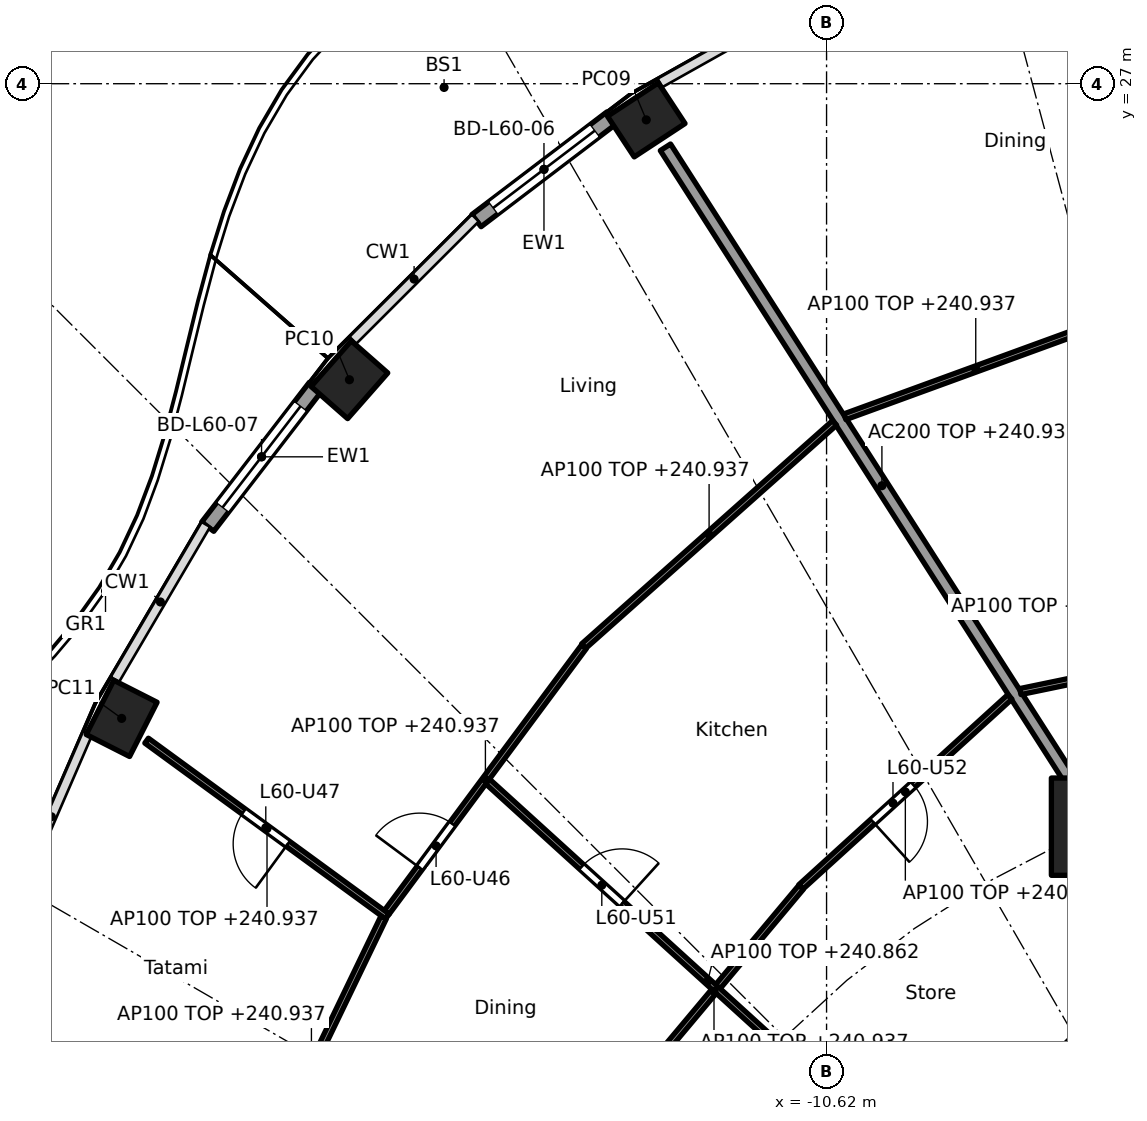
"""IFC4 building model, lengths in metres.
Left out: names, types, materials, properties, quantities, classifications, styles, units other than length and angle.
Written with IfcOpenShell. Run it as: python <this file> out.ifc"""

import sys

from ifc_helpers import new_model, si_unit, direction, frame, frame_2d, origin, origin_2d, place, context, subcontext, project, spatial, rectangle, hollow_rectangle, extrude, element, fill, save


model = new_model("IFC4")
c1 = context("Model", 3, precision=1e-05, world=origin(), true_north=direction((0.0, 1.0)))
c2 = subcontext(c1, "Body", "Model", "MODEL_VIEW")
j1 = project(units=[si_unit("LENGTHUNIT", "METRE"), si_unit("PLANEANGLEUNIT", "RADIAN")], contexts=[c1])
p1 = place(None, origin())
s1 = spatial("IfcSite", under=j1, at=p1, CompositionType="ELEMENT")
p2 = place(p1, origin())
s2 = spatial("IfcBuilding", under=s1, at=p2, CompositionType="ELEMENT")
p3 = place(p2, frame((0.0, 0.0, 238.1)))
s3 = spatial("IfcBuildingStorey", under=s2, at=p3, CompositionType="ELEMENT", Elevation=238.1)
for number, where, z_axis, x_axis in (
    (1, (-13.585, 26.405, 0.0), (0.0, 0.0, 1.0), (-0.836, -0.549, 0.0)),
    (2, (-18.467, 22.132, 0.0), (0.0, 0.0, 1.0), (-0.66, -0.751, 0.0)),
    (3, (-22.212, 16.563, 0.0), (0.0, 0.0, 1.0), (-0.452, -0.892, 0.0)),
):
    element("IfcColumn", number, at=place(p3, frame(where, z_axis=z_axis, x_axis=x_axis)), inside=s3, PredefinedType="COLUMN", context=c2, shape_type="SweptSolid", body=[
        extrude(hollow_rectangle(XDim=1.0, YDim=0.8, WallThickness=0.032, at=origin_2d()), origin(), (0.0, 0.0, 1.0), 3.7),
    ])
p4 = place(p3, frame((-6.123, 14.782, 0.0), z_axis=(0.0, 0.0, 1.0), x_axis=(1.0, 0.0, 0.0)))
e4 = element("IfcColumn", 4, at=p4, inside=s3, PredefinedType="COLUMN", context=c2, shape_type="SweptSolid", body=[
    extrude(rectangle(XDim=1.6, YDim=1.6, at=origin_2d()), origin(), (0.0, 0.0, 1.0), 3.7),
])
p5 = place(p3, frame((-16.377, 24.748, 0.0), z_axis=(0.0, 0.0, 1.0), x_axis=(0.795990084031, 0.60530966135, 0.0)))
e5 = element("IfcWall", 5, at=p5, inside=s3, PredefinedType="SOLIDWALL", context=c2, shape_type="SweptSolid", body=[
    extrude(rectangle(XDim=2.789, YDim=0.25, at=frame_2d((1.394, 0.0))), origin(), (0.0, 0.0, 1.0), 3.44),
])
p6 = place(p5, frame((0.344, 0.0, 0.0)))
e6 = element("IfcOpeningElement", 6, at=p6, cuts=e5, PredefinedType="OPENING", context=c2, shape_type="SweptSolid", body=[
    extrude(rectangle(XDim=2.1, YDim=2.4, at=frame_2d((1.05, 1.2))), frame((0.0, 0.135, 0.0), z_axis=(0.0, -1.0, 0.0), x_axis=(1.0, 0.0, 0.0)), (0.0, 0.0, 1.0), 0.27),
])
p7 = place(p3, frame((-20.797, 19.715, 0.0), z_axis=(0.0, 0.0, 1.0), x_axis=(0.610438565676, 0.792063607001, 0.0)))
e7 = element("IfcWall", 7, at=p7, inside=s3, PredefinedType="SOLIDWALL", context=c2, shape_type="SweptSolid", body=[
    extrude(rectangle(XDim=2.901, YDim=0.25, at=frame_2d((1.45, 0.0))), origin(), (0.0, 0.0, 1.0), 3.44),
])
p8 = place(p7, frame((0.4, 0.0, 0.0)))
e8 = element("IfcOpeningElement", 8, at=p8, cuts=e7, PredefinedType="OPENING", context=c2, shape_type="SweptSolid", body=[
    extrude(rectangle(XDim=2.1, YDim=2.4, at=frame_2d((1.05, 1.2))), frame((0.0, 0.135, 0.0), z_axis=(0.0, -1.0, 0.0), x_axis=(1.0, 0.0, 0.0)), (0.0, 0.0, 1.0), 0.27),
])
p9 = place(p3, frame((-6.15, 14.824, 0.0), z_axis=(0.0, 0.0, 1.0), x_axis=(-0.538870687577, 0.842388498301, 0.0)))
e9 = element("IfcWall", 9, at=p9, inside=s3, PredefinedType="PARTITIONING", context=c2, shape_type="SweptSolid", body=[
    extrude(rectangle(XDim=13.213, YDim=0.2, at=frame_2d((6.606, 0.0))), origin(), (0.0, 0.0, 1.0), 2.837),
])
p10 = place(p3, frame((-5.275, 12.494, 0.0), z_axis=(0.0, 0.0, 1.0), x_axis=(-0.707106781187, -0.707106781187, 0.0)))
e10 = element("IfcWall", 10, at=p10, inside=s3, PredefinedType="PARTITIONING", context=c2, shape_type="SweptSolid", body=[
    extrude(rectangle(XDim=10.209, YDim=0.2, at=frame_2d((5.104, 0.0))), origin(), (0.0, 0.0, 1.0), 3.44),
])
p11 = place(p3, frame((-4.182, 17.678, 0.0), z_axis=(0.0, 0.0, 1.0), x_axis=(-0.979196996208, -0.202911908517, 0.0)))
e11 = element("IfcWall", 11, at=p11, inside=s3, PredefinedType="PARTITIONING", context=c2, shape_type="SweptSolid", body=[
    extrude(rectangle(XDim=3.321, YDim=0.1, at=frame_2d((1.66, 0.0))), origin(), (0.0, 0.0, 1.0), 2.837),
])
p12 = place(p3, frame((-6.014, 23.094, 0.0), z_axis=(0.0, 0.0, 1.0), x_axis=(-0.939433575811, -0.342731026665, 0.0)))
e12 = element("IfcWall", 12, at=p12, inside=s3, PredefinedType="PARTITIONING", context=c2, shape_type="SweptSolid", body=[
    extrude(rectangle(XDim=4.583, YDim=0.1, at=frame_2d((2.291, 0.0))), origin(), (0.0, 0.0, 1.0), 2.837),
])
p13 = place(p3, frame((-7.605, 16.917, 0.0), z_axis=(0.0, 0.0, 1.0), x_axis=(-0.739828340504, -0.672795679673, 0.0)))
e13 = element("IfcWall", 13, at=p13, inside=s3, PredefinedType="PARTITIONING", context=c2, shape_type="SweptSolid", body=[
    extrude(rectangle(XDim=4.647, YDim=0.1, at=frame_2d((2.324, 0.0))), origin(), (0.0, 0.0, 1.0), 2.837),
])
p14 = place(p13, frame((2.148, 0.0, 0.0)))
e14 = element("IfcOpeningElement", 14, at=p14, cuts=e13, PredefinedType="OPENING", context=c2, shape_type="SweptSolid", body=[
    extrude(rectangle(XDim=0.9, YDim=2.1, at=frame_2d((0.45, 1.05))), frame((0.0, 0.06, 0.0), z_axis=(0.0, -1.0, 0.0), x_axis=(1.0, 0.0, 0.0)), (0.0, 0.0, 1.0), 0.12),
])
p15 = place(p3, frame((-10.488, 21.422, 0.0), z_axis=(0.0, 0.0, 1.0), x_axis=(-0.747153269812, -0.66465178207, 0.0)))
e15 = element("IfcWall", 15, at=p15, inside=s3, PredefinedType="PARTITIONING", context=c2, shape_type="SweptSolid", body=[
    extrude(rectangle(XDim=5.525, YDim=0.1, at=frame_2d((2.762, 0.0))), origin(), (0.0, 0.0, 1.0), 2.837),
])
p16 = place(p3, frame((-11.039, 13.785, 0.0), z_axis=(0.0, 0.0, 1.0), x_axis=(-0.642254625966, -0.766491353784, 0.0)))
e16 = element("IfcWall", 16, at=p16, inside=s3, PredefinedType="PARTITIONING", context=c2, shape_type="SweptSolid", body=[
    extrude(rectangle(XDim=4.461, YDim=0.1, at=frame_2d((2.23, 0.0))), origin(), (0.0, 0.0, 1.0), 2.837),
])
p17 = place(p3, frame((-14.608, 17.743, 0.0), z_axis=(0.0, 0.0, 1.0), x_axis=(-0.596174489482, -0.8028548923, 0.0)))
e17 = element("IfcWall", 17, at=p17, inside=s3, PredefinedType="PARTITIONING", context=c2, shape_type="SweptSolid", body=[
    extrude(rectangle(XDim=5.442, YDim=0.1, at=frame_2d((2.721, 0.0))), origin(), (0.0, 0.0, 1.0), 2.837),
])
p18 = place(p17, frame((3.631, 0.0, 0.0)))
e18 = element("IfcOpeningElement", 18, at=p18, cuts=e17, PredefinedType="OPENING", context=c2, shape_type="SweptSolid", body=[
    extrude(rectangle(XDim=0.9, YDim=2.1, at=frame_2d((0.45, 1.05))), frame((0.0, 0.06, 0.0), z_axis=(0.0, -1.0, 0.0), x_axis=(1.0, 0.0, 0.0)), (0.0, 0.0, 1.0), 0.12),
])
p19 = place(p3, frame((-8.959, 8.952, 0.0), z_axis=(0.0, 0.0, 1.0), x_axis=(-0.740140081805, 0.672452719011, 0.0)))
e19 = element("IfcWall", 19, at=p19, inside=s3, PredefinedType="PARTITIONING", context=c2, shape_type="SweptSolid", body=[
    extrude(rectangle(XDim=9.775, YDim=0.1, at=frame_2d((4.887, 0.0))), origin(), (0.0, 0.0, 1.0), 2.762),
])
p20 = place(p19, frame((6.789, 0.0, 0.0)))
e20 = element("IfcOpeningElement", 20, at=p20, cuts=e19, PredefinedType="OPENING", context=c2, shape_type="SweptSolid", body=[
    extrude(rectangle(XDim=0.9, YDim=2.1, at=frame_2d((0.45, 1.05))), frame((0.0, 0.06, 0.0), z_axis=(0.0, -1.0, 0.0), x_axis=(1.0, 0.0, 0.0)), (0.0, 0.0, 1.0), 0.12),
])
p21 = place(p3, frame((-17.842, 13.304, 0.0), z_axis=(0.0, 0.0, 1.0), x_axis=(-0.807541617862, 0.589810592835, 0.0)))
e21 = element("IfcWall", 21, at=p21, inside=s3, PredefinedType="PARTITIONING", context=c2, shape_type="SweptSolid", body=[
    extrude(rectangle(XDim=4.903, YDim=0.1, at=frame_2d((2.452, 0.0))), origin(), (0.0, 0.0, 1.0), 2.837),
])
p22 = place(p21, frame((2.027, 0.0, 0.0)))
e22 = element("IfcOpeningElement", 22, at=p22, cuts=e21, PredefinedType="OPENING", context=c2, shape_type="SweptSolid", body=[
    extrude(rectangle(XDim=0.9, YDim=2.1, at=frame_2d((0.45, 1.05))), frame((0.0, 0.06, 0.0), z_axis=(0.0, -1.0, 0.0), x_axis=(1.0, 0.0, 0.0)), (0.0, 0.0, 1.0), 0.12),
])
p23 = place(p3, frame((-17.904, 13.289, 0.0), z_axis=(0.0, 0.0, 1.0), x_axis=(-0.434292070406, -0.900772111903, 0.0)))
e23 = element("IfcWall", 23, at=p23, inside=s3, PredefinedType="PARTITIONING", context=c2, shape_type="SweptSolid", body=[
    extrude(rectangle(XDim=5.469, YDim=0.1, at=frame_2d((2.734, 0.0))), origin(), (0.0, 0.0, 1.0), 2.837),
])
p24 = place(p6, origin())
e24 = element("IfcDoor", 24, at=p24, inside=s3, OperationType="SLIDING_TO_LEFT", PredefinedType="DOOR", context=c2, shape_type="SweptSolid", body=[
    extrude(rectangle(XDim=2.1, YDim=2.4, at=frame_2d((1.05, 1.2))), frame((0.0, 0.025, 0.0), z_axis=(0.0, -1.0, 0.0), x_axis=(1.0, 0.0, 0.0)), (0.0, 0.0, 1.0), 0.05),
])
fill(e6, e24)
p25 = place(p8, origin())
e25 = element("IfcDoor", 25, at=p25, inside=s3, OperationType="SLIDING_TO_LEFT", PredefinedType="DOOR", context=c2, shape_type="SweptSolid", body=[
    extrude(rectangle(XDim=2.1, YDim=2.4, at=frame_2d((1.05, 1.2))), frame((0.0, 0.025, 0.0), z_axis=(0.0, -1.0, 0.0), x_axis=(1.0, 0.0, 0.0)), (0.0, 0.0, 1.0), 0.05),
])
fill(e8, e25)
p26 = place(p18, frame((0.9, 0.0, 0.0), x_axis=(-1.0, 0.0, 0.0)))
e26 = element("IfcDoor", 26, at=p26, inside=s3, OperationType="SINGLE_SWING_LEFT", PredefinedType="DOOR", context=c2, shape_type="SweptSolid", body=[
    extrude(rectangle(XDim=0.9, YDim=2.1, at=frame_2d((0.45, 1.05))), frame((0.0, 0.025, 0.0), z_axis=(0.0, -1.0, 0.0), x_axis=(1.0, 0.0, 0.0)), (0.0, 0.0, 1.0), 0.05),
])
fill(e18, e26)
p27 = place(p22, origin())
e27 = element("IfcDoor", 27, at=p27, inside=s3, OperationType="SINGLE_SWING_LEFT", PredefinedType="DOOR", context=c2, shape_type="SweptSolid", body=[
    extrude(rectangle(XDim=0.9, YDim=2.1, at=frame_2d((0.45, 1.05))), frame((0.0, 0.025, 0.0), z_axis=(0.0, -1.0, 0.0), x_axis=(1.0, 0.0, 0.0)), (0.0, 0.0, 1.0), 0.05),
])
fill(e22, e27)
p28 = place(p20, frame((0.9, 0.0, 0.0), x_axis=(-1.0, 0.0, 0.0)))
e28 = element("IfcDoor", 28, at=p28, inside=s3, OperationType="SINGLE_SWING_RIGHT", PredefinedType="DOOR", context=c2, shape_type="SweptSolid", body=[
    extrude(rectangle(XDim=0.9, YDim=2.1, at=frame_2d((0.45, 1.05))), frame((0.0, 0.025, 0.0), z_axis=(0.0, -1.0, 0.0), x_axis=(1.0, 0.0, 0.0)), (0.0, 0.0, 1.0), 0.05),
])
fill(e20, e28)
p29 = place(p14, origin())
e29 = element("IfcDoor", 29, at=p29, inside=s3, OperationType="SINGLE_SWING_RIGHT", PredefinedType="DOOR", context=c2, shape_type="SweptSolid", body=[
    extrude(rectangle(XDim=0.9, YDim=2.1, at=frame_2d((0.45, 1.05))), frame((0.0, 0.025, 0.0), z_axis=(0.0, -1.0, 0.0), x_axis=(1.0, 0.0, 0.0)), (0.0, 0.0, 1.0), 0.05),
])
fill(e14, e29)
save(model, sys.argv[1])
